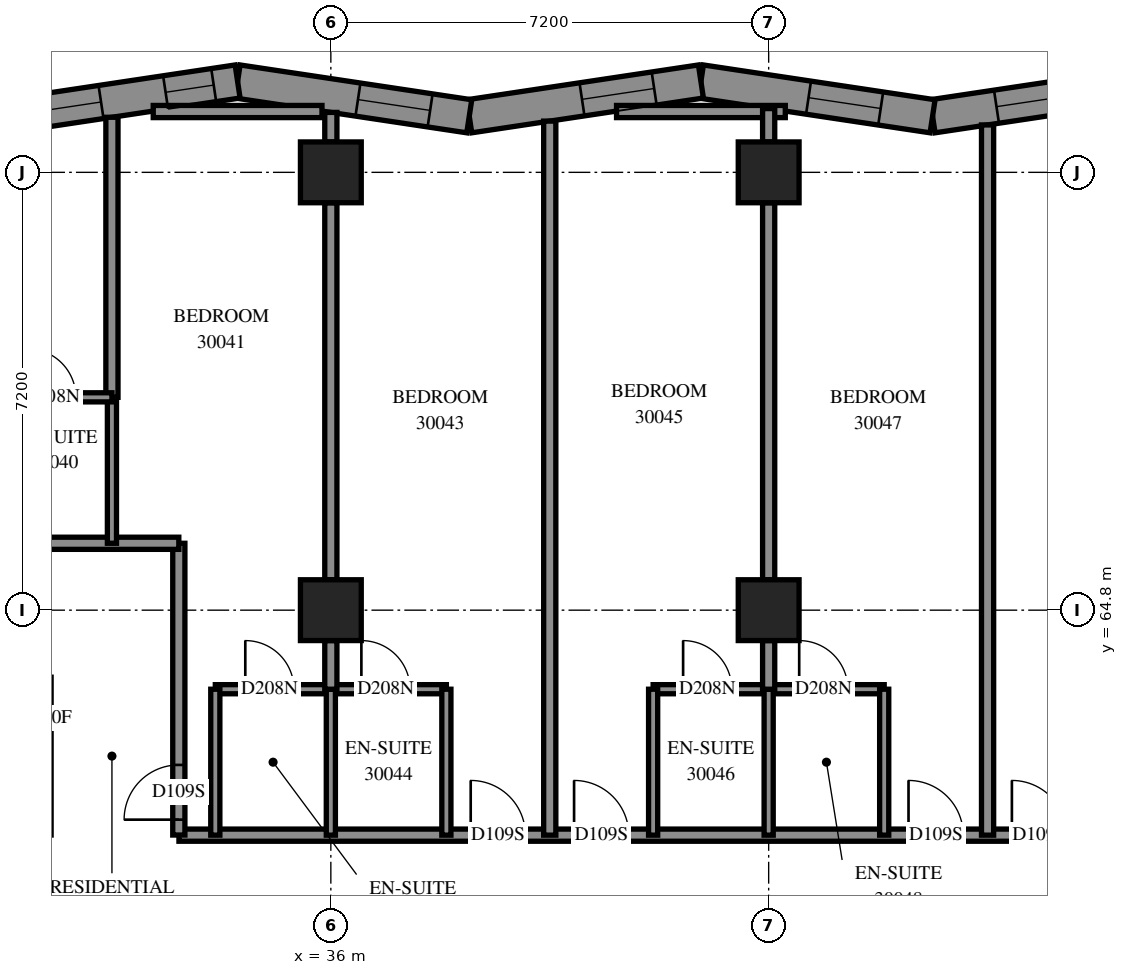
"""IFC4 building model, lengths in metres.
Left out: names, types, materials, properties, quantities, classifications, styles, units other than length and angle.
Written with IfcOpenShell. Run it as: python <this file> out.ifc"""

import sys

from ifc_helpers import new_model, si_unit, direction, frame, frame_2d, origin, origin_2d, place, context, subcontext, project, spatial, polyline, rectangle, outline, extrude, element, fill, save


model = new_model("IFC4")
c1 = context("Model", 3, precision=1e-05, world=origin(), true_north=direction((0.0, 1.0)))
c2 = subcontext(c1, "Body", "Model", "MODEL_VIEW")
j1 = project(units=[si_unit("LENGTHUNIT", "METRE"), si_unit("PLANEANGLEUNIT", "RADIAN")], contexts=[c1])
p1 = place(None, origin())
s1 = spatial("IfcSite", under=j1, at=p1, CompositionType="ELEMENT")
p2 = place(p1, origin())
s2 = spatial("IfcBuilding", under=s1, at=p2, CompositionType="ELEMENT")
p3 = place(p2, frame((0.0, 0.0, 111.8)))
s3 = spatial("IfcBuildingStorey", under=s2, at=p3, CompositionType="ELEMENT", Elevation=111.8)
for number, where, z_axis, x_axis in (
    (1, (36.0, 64.8, 0.0), (0.0, 0.0, 1.0), (1.0, 0.0, 0.0)),
    (2, (36.0, 72.0, 0.0), (0.0, 0.0, 1.0), (1.0, 0.0, 0.0)),
    (3, (43.2, 64.8, 0.0), (0.0, 0.0, 1.0), (1.0, 0.0, 0.0)),
    (4, (43.2, 72.0, 0.0), (0.0, 0.0, 1.0), (1.0, 0.0, 0.0)),
):
    element("IfcColumn", number, at=place(p3, frame(where, z_axis=z_axis, x_axis=x_axis)), inside=s3, PredefinedType="COLUMN", context=c2, shape_type="SweptSolid", body=[
        extrude(rectangle(XDim=1.0, YDim=1.0, at=origin_2d()), origin(), (0.0, 0.0, 1.0), 3.1),
    ])
p4 = place(p3, frame((49.705, 73.494, 0.0), z_axis=(0.0, 0.0, 1.0), x_axis=(-0.9889155896, -0.1484788086, 0.0)))
e5 = element("IfcWall", 5, at=p4, inside=s3, PredefinedType="SOLIDWALL", context=c2, shape_type="SweptSolid", body=[
    extrude(outline(polyline([(-0.041, -0.275), (3.811, -0.275), (3.894, 0.275), (0.041, 0.275), (-0.041, -0.275)])), origin(), (0.0, 0.0, 1.0), 3.1),
])
p5 = place(p4, frame((1.59, 0.0, 0.5)))
e6 = element("IfcOpeningElement", 6, at=p5, cuts=e5, PredefinedType="OPENING", context=c2, shape_type="SweptSolid", body=[
    extrude(rectangle(XDim=1.2, YDim=2.45, at=frame_2d((0.6, 1.225))), frame((0.0, 0.285, 0.0), z_axis=(0.0, -1.0, 0.0), x_axis=(1.0, 0.0, 0.0)), (0.0, 0.0, 1.0), 0.57),
])
p6 = place(p3, frame((45.896, 72.922, 0.0), z_axis=(0.0, 0.0, 1.0), x_axis=(-0.9889150173, 0.1484826202, 0.0)))
e7 = element("IfcWall", 7, at=p6, inside=s3, PredefinedType="SOLIDWALL", context=c2, shape_type="SweptSolid", body=[
    extrude(outline(polyline([(0.041, -0.275), (3.894, -0.275), (3.811, 0.275), (-0.041, 0.275), (0.041, -0.275)])), origin(), (0.0, 0.0, 1.0), 3.1),
])
p7 = place(p6, frame((0.863, 0.0, 0.5)))
e8 = element("IfcOpeningElement", 8, at=p7, cuts=e7, PredefinedType="OPENING", context=c2, shape_type="SweptSolid", body=[
    extrude(rectangle(XDim=1.2, YDim=2.45, at=frame_2d((0.6, 1.225))), frame((0.0, 0.285, 0.0), z_axis=(0.0, -1.0, 0.0), x_axis=(1.0, 0.0, 0.0)), (0.0, 0.0, 1.0), 0.57),
])
p8 = place(p3, frame((42.086, 73.494, 0.0), z_axis=(0.0, 0.0, 1.0), x_axis=(-0.9889155896, -0.1484788086, 0.0)))
e9 = element("IfcWall", 9, at=p8, inside=s3, PredefinedType="SOLIDWALL", context=c2, shape_type="SweptSolid", body=[
    extrude(outline(polyline([(-0.041, -0.275), (3.811, -0.275), (3.894, 0.275), (0.041, 0.275), (-0.041, -0.275)])), origin(), (0.0, 0.0, 1.0), 3.1),
])
p9 = place(p8, frame((0.778, 0.0, 0.5)))
e10 = element("IfcOpeningElement", 10, at=p9, cuts=e9, PredefinedType="OPENING", context=c2, shape_type="SweptSolid", body=[
    extrude(rectangle(XDim=1.2, YDim=2.45, at=frame_2d((0.6, 1.225))), frame((0.0, 0.285, 0.0), z_axis=(0.0, -1.0, 0.0), x_axis=(1.0, 0.0, 0.0)), (0.0, 0.0, 1.0), 0.57),
])
p10 = place(p3, frame((38.276, 72.922, 0.0), z_axis=(0.0, 0.0, 1.0), x_axis=(-0.9889155896, 0.1484788086, 0.0)))
e11 = element("IfcWall", 11, at=p10, inside=s3, PredefinedType="SOLIDWALL", context=c2, shape_type="SweptSolid", body=[
    extrude(outline(polyline([(0.041, -0.275), (3.894, -0.275), (3.811, 0.275), (-0.041, 0.275), (0.041, -0.275)])), origin(), (0.0, 0.0, 1.0), 3.1),
])
p11 = place(p10, frame((0.651, 0.0, 0.5)))
e12 = element("IfcOpeningElement", 12, at=p11, cuts=e11, PredefinedType="OPENING", context=c2, shape_type="SweptSolid", body=[
    extrude(rectangle(XDim=1.2, YDim=2.45, at=frame_2d((0.6, 1.225))), frame((0.0, 0.285, 0.0), z_axis=(0.0, -1.0, 0.0), x_axis=(1.0, 0.0, 0.0)), (0.0, 0.0, 1.0), 0.57),
])
p12 = place(p3, frame((34.467, 73.494, 0.0), z_axis=(0.0, 0.0, 1.0), x_axis=(-0.9889150173, -0.1484826202, 0.0)))
e13 = element("IfcWall", 13, at=p12, inside=s3, PredefinedType="SOLIDWALL", context=c2, shape_type="SweptSolid", body=[
    extrude(outline(polyline([(-0.041, -0.275), (3.811, -0.275), (3.894, 0.275), (0.041, 0.275), (-0.041, -0.275)])), origin(), (0.0, 0.0, 1.0), 3.1),
])
p13 = place(p12, frame((2.271, 0.0, 0.5)))
e14 = element("IfcOpeningElement", 14, at=p13, cuts=e13, PredefinedType="OPENING", context=c2, shape_type="SweptSolid", body=[
    extrude(rectangle(XDim=1.2, YDim=2.45, at=frame_2d((0.6, 1.225))), frame((0.0, 0.285, 0.0), z_axis=(0.0, -1.0, 0.0), x_axis=(1.0, 0.0, 0.0)), (0.0, 0.0, 1.0), 0.57),
])
p14 = place(p12, frame((0.398, 0.0, 0.45)))
e15 = element("IfcOpeningElement", 15, at=p14, cuts=e13, PredefinedType="OPENING", context=c2, shape_type="SweptSolid", body=[
    extrude(rectangle(XDim=0.8, YDim=2.5, at=frame_2d((0.4, 1.25))), frame((0.0, 0.285, 0.0), z_axis=(0.0, -1.0, 0.0), x_axis=(1.0, 0.0, 0.0)), (0.0, 0.0, 1.0), 0.57),
])
p15 = place(p3, frame((33.502, 61.1, 0.0), z_axis=(0.0, 0.0, 1.0), x_axis=(1.0, 0.0, 0.0)))
e16 = element("IfcWall", 16, at=p15, inside=s3, PredefinedType="PARTITIONING", context=c2, shape_type="SweptSolid", body=[
    extrude(rectangle(XDim=21.198, YDim=0.2, at=frame_2d((10.599, 0.0))), origin(), (0.0, 0.0, 1.0), 3.1),
])
p16 = place(p15, frame((4.798, 0.0, 0.0)))
e17 = element("IfcOpeningElement", 17, at=p16, cuts=e16, PredefinedType="OPENING", context=c2, shape_type="SweptSolid", body=[
    extrude(rectangle(XDim=0.9, YDim=2.1, at=frame_2d((0.45, 1.05))), frame((0.0, 0.11, 0.0), z_axis=(0.0, -1.0, 0.0), x_axis=(1.0, 0.0, 0.0)), (0.0, 0.0, 1.0), 0.22),
])
p17 = place(p15, frame((6.498, 0.0, 0.0)))
e18 = element("IfcOpeningElement", 18, at=p17, cuts=e16, PredefinedType="OPENING", context=c2, shape_type="SweptSolid", body=[
    extrude(rectangle(XDim=0.9, YDim=2.1, at=frame_2d((0.45, 1.05))), frame((0.0, 0.11, 0.0), z_axis=(0.0, -1.0, 0.0), x_axis=(1.0, 0.0, 0.0)), (0.0, 0.0, 1.0), 0.22),
])
p18 = place(p15, frame((11.998, 0.0, 0.0)))
e19 = element("IfcOpeningElement", 19, at=p18, cuts=e16, PredefinedType="OPENING", context=c2, shape_type="SweptSolid", body=[
    extrude(rectangle(XDim=0.9, YDim=2.1, at=frame_2d((0.45, 1.05))), frame((0.0, 0.11, 0.0), z_axis=(0.0, -1.0, 0.0), x_axis=(1.0, 0.0, 0.0)), (0.0, 0.0, 1.0), 0.22),
])
p19 = place(p15, frame((13.698, 0.0, 0.0)))
e20 = element("IfcOpeningElement", 20, at=p19, cuts=e16, PredefinedType="OPENING", context=c2, shape_type="SweptSolid", body=[
    extrude(rectangle(XDim=0.9, YDim=2.1, at=frame_2d((0.45, 1.05))), frame((0.0, 0.11, 0.0), z_axis=(0.0, -1.0, 0.0), x_axis=(1.0, 0.0, 0.0)), (0.0, 0.0, 1.0), 0.22),
])
p20 = place(p15, frame((19.198, 0.0, 0.0)))
e21 = element("IfcOpeningElement", 21, at=p20, cuts=e16, PredefinedType="OPENING", context=c2, shape_type="SweptSolid", body=[
    extrude(rectangle(XDim=0.9, YDim=2.1, at=frame_2d((0.45, 1.05))), frame((0.0, 0.11, 0.0), z_axis=(0.0, -1.0, 0.0), x_axis=(1.0, 0.0, 0.0)), (0.0, 0.0, 1.0), 0.22),
])
p21 = place(p3, frame((39.6, 61.1, 0.0), z_axis=(0.0, 0.0, 1.0), x_axis=(0.0, 1.0, 0.0)))
e22 = element("IfcWall", 22, at=p21, inside=s3, PredefinedType="PARTITIONING", context=c2, shape_type="SweptSolid", body=[
    extrude(rectangle(XDim=11.743, YDim=0.2, at=frame_2d((5.871, 0.0))), origin(), (0.0, 0.0, 1.0), 3.1),
])
p22 = place(p3, frame((46.8, 61.1, 0.0), z_axis=(0.0, 0.0, 1.0), x_axis=(0.0, 1.0, 0.0)))
e23 = element("IfcWall", 23, at=p22, inside=s3, PredefinedType="PARTITIONING", context=c2, shape_type="SweptSolid", body=[
    extrude(rectangle(XDim=11.68, YDim=0.2, at=frame_2d((5.84, 0.0))), origin(), (0.0, 0.0, 1.0), 3.1),
])
for number, where, z_axis, x_axis in (
    (24, (36.0, 65.3, 0.0), (0.0, 0.0, 1.0), (0.0, 1.0, 0.0)),
    (25, (43.2, 65.3, 0.0), (0.0, 0.0, 1.0), (0.0, 1.0, 0.0)),
):
    element("IfcWall", number, at=place(p3, frame(where, z_axis=z_axis, x_axis=x_axis)), inside=s3, PredefinedType="PARTITIONING", context=c2, shape_type="SweptSolid", body=[
        extrude(rectangle(XDim=6.2, YDim=0.2, at=frame_2d((3.1, 0.0))), origin(), (0.0, 0.0, 1.0), 3.1),
    ])
p23 = place(p3, frame((33.5, 61.102, 0.0), z_axis=(0.0, 0.0, 1.0), x_axis=(0.0, 1.0, 0.0)))
e26 = element("IfcWall", 26, at=p23, inside=s3, PredefinedType="PARTITIONING", context=c2, shape_type="SweptSolid", body=[
    extrude(rectangle(XDim=4.798, YDim=0.2, at=frame_2d((2.399, 0.0))), origin(), (0.0, 0.0, 1.0), 3.1),
])
p24 = place(p23, frame((0.253, 0.0, 0.0)))
e27 = element("IfcOpeningElement", 27, at=p24, cuts=e26, PredefinedType="OPENING", context=c2, shape_type="SweptSolid", body=[
    extrude(rectangle(XDim=0.9, YDim=2.1, at=frame_2d((0.45, 1.05))), frame((0.0, 0.11, 0.0), z_axis=(0.0, -1.0, 0.0), x_axis=(1.0, 0.0, 0.0)), (0.0, 0.0, 1.0), 0.22),
])
p25 = place(p3, frame((32.4, 68.3, 0.0), z_axis=(0.0, 0.0, 1.0), x_axis=(0.0, 1.0, 0.0)))
e28 = element("IfcWall", 28, at=p25, inside=s3, PredefinedType="PARTITIONING", context=c2, shape_type="SweptSolid", body=[
    extrude(rectangle(XDim=4.606, YDim=0.2, at=frame_2d((2.303, 0.0))), origin(), (0.0, 0.0, 1.0), 3.1),
])
p26 = place(p3, frame((41.3, 63.5, 0.0), z_axis=(0.0, 0.0, 1.0), x_axis=(1.0, 0.0, 0.0)))
e29 = element("IfcWall", 29, at=p26, inside=s3, PredefinedType="PARTITIONING", context=c2, shape_type="SweptSolid", body=[
    extrude(rectangle(XDim=3.8, YDim=0.15, at=frame_2d((1.9, 0.0))), origin(), (0.0, 0.0, 1.0), 3.1),
])
p27 = place(p26, frame((0.493, 0.0, 0.0)))
e30 = element("IfcOpeningElement", 30, at=p27, cuts=e29, PredefinedType="OPENING", context=c2, shape_type="SweptSolid", body=[
    extrude(rectangle(XDim=0.8, YDim=2.1, at=frame_2d((0.4, 1.05))), frame((0.0, 0.085, 0.0), z_axis=(0.0, -1.0, 0.0), x_axis=(1.0, 0.0, 0.0)), (0.0, 0.0, 1.0), 0.17),
])
p28 = place(p26, frame((2.402, 0.0, 0.0)))
e31 = element("IfcOpeningElement", 31, at=p28, cuts=e29, PredefinedType="OPENING", context=c2, shape_type="SweptSolid", body=[
    extrude(rectangle(XDim=0.8, YDim=2.1, at=frame_2d((0.4, 1.05))), frame((0.0, 0.085, 0.0), z_axis=(0.0, -1.0, 0.0), x_axis=(1.0, 0.0, 0.0)), (0.0, 0.0, 1.0), 0.17),
])
p29 = place(p3, frame((34.1, 63.5, 0.0), z_axis=(0.0, 0.0, 1.0), x_axis=(1.0, 0.0, 0.0)))
e32 = element("IfcWall", 32, at=p29, inside=s3, PredefinedType="PARTITIONING", context=c2, shape_type="SweptSolid", body=[
    extrude(rectangle(XDim=3.8, YDim=0.15, at=frame_2d((1.9, 0.0))), origin(), (0.0, 0.0, 1.0), 3.1),
])
p30 = place(p29, frame((0.493, 0.0, 0.0)))
e33 = element("IfcOpeningElement", 33, at=p30, cuts=e32, PredefinedType="OPENING", context=c2, shape_type="SweptSolid", body=[
    extrude(rectangle(XDim=0.8, YDim=2.1, at=frame_2d((0.4, 1.05))), frame((0.0, 0.085, 0.0), z_axis=(0.0, -1.0, 0.0), x_axis=(1.0, 0.0, 0.0)), (0.0, 0.0, 1.0), 0.17),
])
p31 = place(p29, frame((2.402, 0.0, 0.0)))
e34 = element("IfcOpeningElement", 34, at=p31, cuts=e32, PredefinedType="OPENING", context=c2, shape_type="SweptSolid", body=[
    extrude(rectangle(XDim=0.8, YDim=2.1, at=frame_2d((0.4, 1.05))), frame((0.0, 0.085, 0.0), z_axis=(0.0, -1.0, 0.0), x_axis=(1.0, 0.0, 0.0)), (0.0, 0.0, 1.0), 0.17),
])
p32 = place(p3, frame((30.552, 65.9, 0.0), z_axis=(0.0, 0.0, 1.0), x_axis=(1.0, 0.0, 0.0)))
e35 = element("IfcWall", 35, at=p32, inside=s3, PredefinedType="PARTITIONING", context=c2, shape_type="SweptSolid", body=[
    extrude(rectangle(XDim=2.948, YDim=0.2, at=frame_2d((1.474, 0.0))), origin(), (0.0, 0.0, 1.0), 3.1),
])
for number, where, z_axis, x_axis in (
    (36, (40.698, 73.0, 0.0), (0.0, 0.0, 1.0), (1.0, 0.0, 0.0)),
    (37, (33.079, 73.0, 0.0), (0.0, 0.0, 1.0), (1.0, 0.0, 0.0)),
):
    element("IfcWall", number, at=place(p3, frame(where, z_axis=z_axis, x_axis=x_axis)), inside=s3, PredefinedType="PARTITIONING", context=c2, shape_type="SweptSolid", body=[
        extrude(rectangle(XDim=2.775, YDim=0.2, at=frame_2d((1.388, 0.0))), origin(), (0.0, 0.0, 1.0), 3.1),
    ])
for number, where, z_axis, x_axis in (
    (38, (34.1, 61.1, 0.0), (0.0, 0.0, 1.0), (0.0, 1.0, 0.0)),
    (39, (36.0, 61.1, 0.0), (0.0, 0.0, 1.0), (0.0, 1.0, 0.0)),
    (40, (37.9, 61.1, 0.0), (0.0, 0.0, 1.0), (0.0, 1.0, 0.0)),
    (41, (41.3, 61.1, 0.0), (0.0, 0.0, 1.0), (0.0, 1.0, 0.0)),
    (42, (43.2, 61.1, 0.0), (0.0, 0.0, 1.0), (0.0, 1.0, 0.0)),
    (43, (45.1, 61.1, 0.0), (0.0, 0.0, 1.0), (0.0, 1.0, 0.0)),
    (44, (32.4, 65.9, 0.0), (0.0, 0.0, 1.0), (0.0, 1.0, 0.0)),
):
    element("IfcWall", number, at=place(p3, frame(where, z_axis=z_axis, x_axis=x_axis)), inside=s3, PredefinedType="PARTITIONING", context=c2, shape_type="SweptSolid", body=[
        extrude(rectangle(XDim=2.4, YDim=0.15, at=frame_2d((1.2, 0.0))), origin(), (0.0, 0.0, 1.0), 3.1),
    ])
p33 = place(p3, frame((30.5, 68.3, 0.0), z_axis=(0.0, 0.0, 1.0), x_axis=(1.0, 0.0, 0.0)))
e45 = element("IfcWall", 45, at=p33, inside=s3, PredefinedType="PARTITIONING", context=c2, shape_type="SweptSolid", body=[
    extrude(rectangle(XDim=1.9, YDim=0.15, at=frame_2d((0.95, 0.0))), origin(), (0.0, 0.0, 1.0), 3.1),
])
p34 = place(p33, frame((0.507, 0.0, 0.0)))
e46 = element("IfcOpeningElement", 46, at=p34, cuts=e45, PredefinedType="OPENING", context=c2, shape_type="SweptSolid", body=[
    extrude(rectangle(XDim=0.8, YDim=2.1, at=frame_2d((0.4, 1.05))), frame((0.0, 0.085, 0.0), z_axis=(0.0, -1.0, 0.0), x_axis=(1.0, 0.0, 0.0)), (0.0, 0.0, 1.0), 0.17),
])
for number, where, z_axis, x_axis in (
    (47, (36.0, 63.5, 0.0), (0.0, 0.0, 1.0), (0.0, 1.0, 0.0)),
    (48, (43.2, 63.5, 0.0), (0.0, 0.0, 1.0), (0.0, 1.0, 0.0)),
):
    element("IfcWall", number, at=place(p3, frame(where, z_axis=z_axis, x_axis=x_axis)), inside=s3, PredefinedType="PARTITIONING", context=c2, shape_type="SweptSolid", body=[
        extrude(rectangle(XDim=0.8, YDim=0.2, at=frame_2d((0.4, 0.0))), origin(), (0.0, 0.0, 1.0), 3.1),
    ])
p35 = place(p3, frame((43.2, 72.5, 0.0), z_axis=(0.0, 0.0, 1.0), x_axis=(0.0, 1.0, 0.0)))
e49 = element("IfcWall", 49, at=p35, inside=s3, PredefinedType="PARTITIONING", context=c2, shape_type="SweptSolid", body=[
    extrude(rectangle(XDim=0.549, YDim=0.2, at=frame_2d((0.274, 0.0))), origin(), (0.0, 0.0, 1.0), 3.1),
])
p36 = place(p3, frame((36.0, 72.5, 0.0), z_axis=(0.0, 0.0, 1.0), x_axis=(0.0, 1.0, 0.0)))
e50 = element("IfcWall", 50, at=p36, inside=s3, PredefinedType="PARTITIONING", context=c2, shape_type="SweptSolid", body=[
    extrude(rectangle(XDim=0.486, YDim=0.2, at=frame_2d((0.243, 0.0))), origin(), (0.0, 0.0, 1.0), 3.1),
])
p37 = place(p5, origin())
e51 = element("IfcWindow", 51, at=p37, inside=s3, PartitioningType="SINGLE_PANEL", PredefinedType="WINDOW", context=c2, shape_type="SweptSolid", body=[
    extrude(rectangle(XDim=1.2, YDim=2.45, at=frame_2d((0.6, 1.225))), frame((0.0, 0.155, 0.0), z_axis=(0.0, -1.0, 0.0), x_axis=(1.0, 0.0, 0.0)), (0.0, 0.0, 1.0), 0.06),
])
fill(e6, e51)
p38 = place(p7, origin())
e52 = element("IfcWindow", 52, at=p38, inside=s3, PartitioningType="SINGLE_PANEL", PredefinedType="WINDOW", context=c2, shape_type="SweptSolid", body=[
    extrude(rectangle(XDim=1.2, YDim=2.45, at=frame_2d((0.6, 1.225))), frame((0.0, 0.155, 0.0), z_axis=(0.0, -1.0, 0.0), x_axis=(1.0, 0.0, 0.0)), (0.0, 0.0, 1.0), 0.06),
])
fill(e8, e52)
p39 = place(p9, origin())
e53 = element("IfcWindow", 53, at=p39, inside=s3, PartitioningType="SINGLE_PANEL", PredefinedType="WINDOW", context=c2, shape_type="SweptSolid", body=[
    extrude(rectangle(XDim=1.2, YDim=2.45, at=frame_2d((0.6, 1.225))), frame((0.0, 0.145, 0.0), z_axis=(0.0, -1.0, 0.0), x_axis=(1.0, 0.0, 0.0)), (0.0, 0.0, 1.0), 0.06),
])
fill(e10, e53)
p40 = place(p11, origin())
e54 = element("IfcWindow", 54, at=p40, inside=s3, PartitioningType="SINGLE_PANEL", PredefinedType="WINDOW", context=c2, shape_type="SweptSolid", body=[
    extrude(rectangle(XDim=1.2, YDim=2.45, at=frame_2d((0.6, 1.225))), frame((0.0, 0.155, 0.0), z_axis=(0.0, -1.0, 0.0), x_axis=(1.0, 0.0, 0.0)), (0.0, 0.0, 1.0), 0.06),
])
fill(e12, e54)
p41 = place(p13, origin())
e55 = element("IfcWindow", 55, at=p41, inside=s3, PartitioningType="SINGLE_PANEL", PredefinedType="WINDOW", context=c2, shape_type="SweptSolid", body=[
    extrude(rectangle(XDim=1.2, YDim=2.45, at=frame_2d((0.6, 1.225))), frame((0.0, 0.155, 0.0), z_axis=(0.0, -1.0, 0.0), x_axis=(1.0, 0.0, 0.0)), (0.0, 0.0, 1.0), 0.06),
])
fill(e14, e55)
p42 = place(p34, origin())
e56 = element("IfcDoor", 56, at=p42, inside=s3, OperationType="SINGLE_SWING_RIGHT", PredefinedType="DOOR", context=c2, shape_type="SweptSolid", body=[
    extrude(rectangle(XDim=0.8, YDim=2.1, at=frame_2d((0.4, 1.05))), frame((0.0, 0.025, 0.0), z_axis=(0.0, -1.0, 0.0), x_axis=(1.0, 0.0, 0.0)), (0.0, 0.0, 1.0), 0.05),
])
fill(e46, e56)
p43 = place(p24, origin())
e57 = element("IfcDoor", 57, at=p43, inside=s3, OperationType="SINGLE_SWING_LEFT", PredefinedType="DOOR", context=c2, shape_type="SweptSolid", body=[
    extrude(rectangle(XDim=0.9, YDim=2.1, at=frame_2d((0.45, 1.05))), frame((0.0, 0.025, 0.0), z_axis=(0.0, -1.0, 0.0), x_axis=(1.0, 0.0, 0.0)), (0.0, 0.0, 1.0), 0.05),
])
fill(e27, e57)
p44 = place(p30, origin())
e58 = element("IfcDoor", 58, at=p44, inside=s3, OperationType="SINGLE_SWING_RIGHT", PredefinedType="DOOR", context=c2, shape_type="SweptSolid", body=[
    extrude(rectangle(XDim=0.8, YDim=2.1, at=frame_2d((0.4, 1.05))), frame((0.0, 0.025, 0.0), z_axis=(0.0, -1.0, 0.0), x_axis=(1.0, 0.0, 0.0)), (0.0, 0.0, 1.0), 0.05),
])
fill(e33, e58)
p45 = place(p16, origin())
e59 = element("IfcDoor", 59, at=p45, inside=s3, OperationType="SINGLE_SWING_RIGHT", PredefinedType="DOOR", context=c2, shape_type="SweptSolid", body=[
    extrude(rectangle(XDim=0.9, YDim=2.1, at=frame_2d((0.45, 1.05))), frame((0.0, 0.025, 0.0), z_axis=(0.0, -1.0, 0.0), x_axis=(1.0, 0.0, 0.0)), (0.0, 0.0, 1.0), 0.05),
])
fill(e17, e59)
p46 = place(p31, origin())
e60 = element("IfcDoor", 60, at=p46, inside=s3, OperationType="SINGLE_SWING_RIGHT", PredefinedType="DOOR", context=c2, shape_type="SweptSolid", body=[
    extrude(rectangle(XDim=0.8, YDim=2.1, at=frame_2d((0.4, 1.05))), frame((0.0, 0.025, 0.0), z_axis=(0.0, -1.0, 0.0), x_axis=(1.0, 0.0, 0.0)), (0.0, 0.0, 1.0), 0.05),
])
fill(e34, e60)
p47 = place(p17, origin())
e61 = element("IfcDoor", 61, at=p47, inside=s3, OperationType="SINGLE_SWING_LEFT", PredefinedType="DOOR", context=c2, shape_type="SweptSolid", body=[
    extrude(rectangle(XDim=0.9, YDim=2.1, at=frame_2d((0.45, 1.05))), frame((0.0, 0.025, 0.0), z_axis=(0.0, -1.0, 0.0), x_axis=(1.0, 0.0, 0.0)), (0.0, 0.0, 1.0), 0.05),
])
fill(e18, e61)
p48 = place(p27, origin())
e62 = element("IfcDoor", 62, at=p48, inside=s3, OperationType="SINGLE_SWING_RIGHT", PredefinedType="DOOR", context=c2, shape_type="SweptSolid", body=[
    extrude(rectangle(XDim=0.8, YDim=2.1, at=frame_2d((0.4, 1.05))), frame((0.0, 0.025, 0.0), z_axis=(0.0, -1.0, 0.0), x_axis=(1.0, 0.0, 0.0)), (0.0, 0.0, 1.0), 0.05),
])
fill(e30, e62)
p49 = place(p18, origin())
e63 = element("IfcDoor", 63, at=p49, inside=s3, OperationType="SINGLE_SWING_RIGHT", PredefinedType="DOOR", context=c2, shape_type="SweptSolid", body=[
    extrude(rectangle(XDim=0.9, YDim=2.1, at=frame_2d((0.45, 1.05))), frame((0.0, 0.025, 0.0), z_axis=(0.0, -1.0, 0.0), x_axis=(1.0, 0.0, 0.0)), (0.0, 0.0, 1.0), 0.05),
])
fill(e19, e63)
p50 = place(p28, origin())
e64 = element("IfcDoor", 64, at=p50, inside=s3, OperationType="SINGLE_SWING_RIGHT", PredefinedType="DOOR", context=c2, shape_type="SweptSolid", body=[
    extrude(rectangle(XDim=0.8, YDim=2.1, at=frame_2d((0.4, 1.05))), frame((0.0, 0.025, 0.0), z_axis=(0.0, -1.0, 0.0), x_axis=(1.0, 0.0, 0.0)), (0.0, 0.0, 1.0), 0.05),
])
fill(e31, e64)
p51 = place(p19, origin())
e65 = element("IfcDoor", 65, at=p51, inside=s3, OperationType="SINGLE_SWING_LEFT", PredefinedType="DOOR", context=c2, shape_type="SweptSolid", body=[
    extrude(rectangle(XDim=0.9, YDim=2.1, at=frame_2d((0.45, 1.05))), frame((0.0, 0.025, 0.0), z_axis=(0.0, -1.0, 0.0), x_axis=(1.0, 0.0, 0.0)), (0.0, 0.0, 1.0), 0.05),
])
fill(e20, e65)
p52 = place(p14, origin())
e66 = element("IfcWindow", 66, at=p52, inside=s3, PartitioningType="SINGLE_PANEL", PredefinedType="WINDOW", context=c2, shape_type="SweptSolid", body=[
    extrude(rectangle(XDim=0.8, YDim=2.5, at=frame_2d((0.4, 1.25))), frame((0.0, 0.155, 0.0), z_axis=(0.0, -1.0, 0.0), x_axis=(1.0, 0.0, 0.0)), (0.0, 0.0, 1.0), 0.06),
])
fill(e15, e66)
save(model, sys.argv[1])
